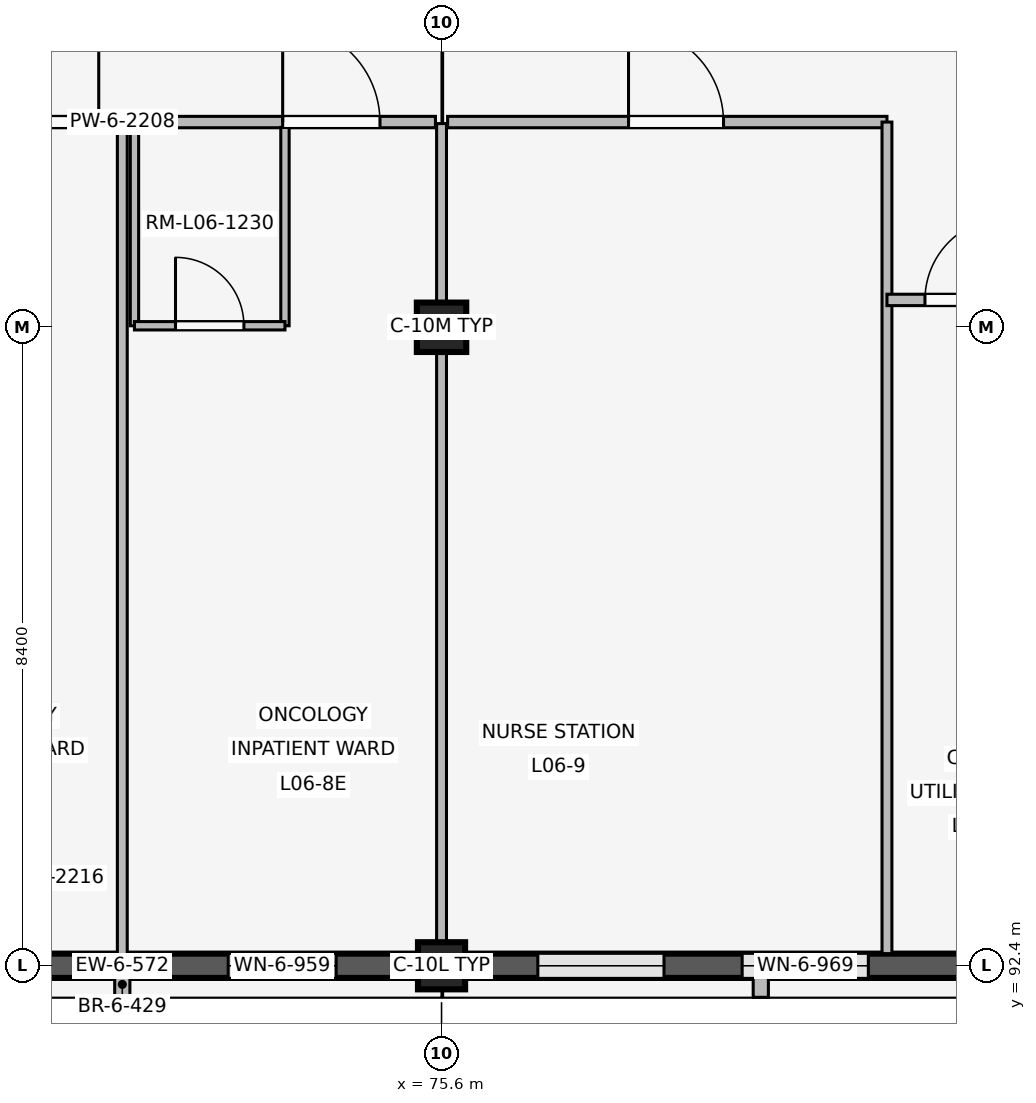
"""IFC4 building model, lengths in metres.
Left out: names, types, materials, properties, quantities, classifications, styles, units other than length and angle.
Written with IfcOpenShell. Run it as: python <this file> out.ifc"""

import sys

from ifc_helpers import new_model, si_unit, direction, frame, frame_2d, origin, origin_2d, place, context, subcontext, project, spatial, rectangle, extrude, element, fill, save


model = new_model("IFC4")
c1 = context("Model", 3, precision=1e-05, world=origin(), true_north=direction((0.0, 1.0)))
c2 = subcontext(c1, "Body", "Model", "MODEL_VIEW")
j1 = project(units=[si_unit("LENGTHUNIT", "METRE"), si_unit("PLANEANGLEUNIT", "RADIAN")], contexts=[c1])
p1 = place(None, origin())
s1 = spatial("IfcSite", under=j1, at=p1, CompositionType="ELEMENT")
p2 = place(p1, origin())
s2 = spatial("IfcBuilding", under=s1, at=p2, CompositionType="ELEMENT")
p3 = place(p2, frame((0.0, 0.0, 24.6)))
s3 = spatial("IfcBuildingStorey", under=s2, at=p3, CompositionType="ELEMENT", Elevation=24.6)
p4 = place(p3, frame((75.6, 92.4, 0.0), z_axis=(0.0, 0.0, 1.0), x_axis=(1.0, 0.0, 0.0)))
e1 = element("IfcColumn", 1, at=p4, inside=s3, PredefinedType="COLUMN", context=c2, shape_type="SweptSolid", body=[
    extrude(rectangle(XDim=0.62, YDim=0.62, at=origin_2d()), origin(), (0.0, 0.0, 1.0), 4.2),
])
p5 = place(p3, frame((75.6, 100.8, 0.0), z_axis=(0.0, 0.0, 1.0), x_axis=(1.0, 0.0, 0.0)))
e2 = element("IfcColumn", 2, at=p5, inside=s3, PredefinedType="COLUMN", context=c2, shape_type="SweptSolid", body=[
    extrude(rectangle(XDim=0.65, YDim=0.65, at=origin_2d()), origin(), (0.0, 0.0, 1.0), 4.2),
])
p6 = place(p3, frame((75.295, 92.4, 0.0), z_axis=(0.0, 0.0, 1.0), x_axis=(-1.0, 0.0, 0.0)))
e3 = element("IfcWall", 3, at=p6, inside=s3, PredefinedType="SOLIDWALL", context=c2, shape_type="SweptSolid", body=[
    extrude(rectangle(XDim=7.79, YDim=0.32, at=frame_2d((3.895, 0.0))), origin(), (0.0, 0.0, 1.0), 3.34),
])
p7 = place(p6, frame((1.082, 0.0, 0.85)))
e4 = element("IfcOpeningElement", 4, at=p7, cuts=e3, PredefinedType="OPENING", context=c2, shape_type="SweptSolid", body=[
    extrude(rectangle(XDim=1.42, YDim=1.45, at=frame_2d((0.71, 0.725))), frame((0.0, 0.17, 0.0), z_axis=(0.0, -1.0, 0.0), x_axis=(1.0, 0.0, 0.0)), (0.0, 0.0, 1.0), 0.34),
])
p8 = place(p6, frame((5.288, 0.0, 0.85)))
e5 = element("IfcOpeningElement", 5, at=p8, cuts=e3, PredefinedType="OPENING", context=c2, shape_type="SweptSolid", body=[
    extrude(rectangle(XDim=1.42, YDim=1.45, at=frame_2d((0.71, 0.725))), frame((0.0, 0.17, 0.0), z_axis=(0.0, -1.0, 0.0), x_axis=(1.0, 0.0, 0.0)), (0.0, 0.0, 1.0), 0.34),
])
p9 = place(p3, frame((71.4, 92.325, 0.0), z_axis=(0.0, 0.0, 1.0), x_axis=(0.0, -1.0, 0.0)))
e6 = element("IfcWall", 6, at=p9, inside=s3, PredefinedType="ELEMENTEDWALL", context=c2, shape_type="SweptSolid", body=[
    extrude(rectangle(XDim=0.34, YDim=0.2, at=frame_2d((0.17, 0.0))), origin(), (0.0, 0.0, 1.0), 3.32),
])
p10 = place(p3, frame((83.695, 92.4, 0.0), z_axis=(0.0, 0.0, 1.0), x_axis=(-1.0, 0.0, 0.0)))
e7 = element("IfcWall", 7, at=p10, inside=s3, PredefinedType="SOLIDWALL", context=c2, shape_type="SweptSolid", body=[
    extrude(rectangle(XDim=7.79, YDim=0.32, at=frame_2d((3.895, 0.0))), origin(), (0.0, 0.0, 1.0), 3.34),
])
p11 = place(p10, frame((2.48, 0.0, 0.85)))
e8 = element("IfcOpeningElement", 8, at=p11, cuts=e7, PredefinedType="OPENING", context=c2, shape_type="SweptSolid", body=[
    extrude(rectangle(XDim=1.66, YDim=1.95, at=frame_2d((0.83, 0.975))), frame((0.0, 0.17, 0.0), z_axis=(0.0, -1.0, 0.0), x_axis=(1.0, 0.0, 0.0)), (0.0, 0.0, 1.0), 0.34),
])
p12 = place(p10, frame((5.168, 0.0, 0.85)))
e9 = element("IfcOpeningElement", 9, at=p12, cuts=e7, PredefinedType="OPENING", context=c2, shape_type="SweptSolid", body=[
    extrude(rectangle(XDim=1.66, YDim=1.95, at=frame_2d((0.83, 0.975))), frame((0.0, 0.17, 0.0), z_axis=(0.0, -1.0, 0.0), x_axis=(1.0, 0.0, 0.0)), (0.0, 0.0, 1.0), 0.34),
])
p13 = place(p3, frame((79.8, 92.325, 0.0), z_axis=(0.0, 0.0, 1.0), x_axis=(0.0, -1.0, 0.0)))
e10 = element("IfcWall", 10, at=p13, inside=s3, PredefinedType="ELEMENTEDWALL", context=c2, shape_type="SweptSolid", body=[
    extrude(rectangle(XDim=0.34, YDim=0.2, at=frame_2d((0.17, 0.0))), origin(), (0.0, 0.0, 1.0), 3.32),
])
p14 = place(p3, frame((67.28, 103.5, 0.0), z_axis=(0.0, 0.0, 1.0), x_axis=(1.0, 0.0, 0.0)))
e11 = element("IfcWall", 11, at=p14, inside=s3, PredefinedType="PARTITIONING", context=c2, shape_type="SweptSolid", body=[
    extrude(rectangle(XDim=8.24, YDim=0.15, at=frame_2d((4.12, 0.0))), origin(), (0.0, 0.0, 1.0), 3.32),
])
p15 = place(p14, frame((2.53, 0.0, 0.0)))
e12 = element("IfcOpeningElement", 12, at=p15, cuts=e11, PredefinedType="OPENING", context=c2, shape_type="SweptSolid", body=[
    extrude(rectangle(XDim=1.28, YDim=2.2, at=frame_2d((0.64, 1.1))), frame((0.0, 0.085, 0.0), z_axis=(0.0, -1.0, 0.0), x_axis=(1.0, 0.0, 0.0)), (0.0, 0.0, 1.0), 0.17),
])
p16 = place(p14, frame((6.23, 0.0, 0.0)))
e13 = element("IfcOpeningElement", 13, at=p16, cuts=e11, PredefinedType="OPENING", context=c2, shape_type="SweptSolid", body=[
    extrude(rectangle(XDim=1.28, YDim=2.2, at=frame_2d((0.64, 1.1))), frame((0.0, 0.085, 0.0), z_axis=(0.0, -1.0, 0.0), x_axis=(1.0, 0.0, 0.0)), (0.0, 0.0, 1.0), 0.17),
])
p17 = place(p3, frame((71.4, 92.5, 0.0), z_axis=(0.0, 0.0, 1.0), x_axis=(0.0, 1.0, 0.0)))
e14 = element("IfcWall", 14, at=p17, inside=s3, PredefinedType="PARTITIONING", context=c2, shape_type="SweptSolid", body=[
    extrude(rectangle(XDim=10.93, YDim=0.13, at=frame_2d((5.465, 0.0))), origin(), (0.0, 0.0, 1.0), 3.32),
])
for number, where, z_axis, x_axis in (
    (15, (71.56, 100.82, 0.0), (0.0, 0.0, 1.0), (0.0, 1.0, 0.0)),
    (16, (73.54, 100.82, 0.0), (0.0, 0.0, 1.0), (0.0, 1.0, 0.0)),
):
    element("IfcWall", number, at=place(p3, frame(where, z_axis=z_axis, x_axis=x_axis)), inside=s3, PredefinedType="PARTITIONING", context=c2, shape_type="SweptSolid", body=[
        extrude(rectangle(XDim=2.61, YDim=0.11, at=frame_2d((1.305, 0.0))), origin(), (0.0, 0.0, 1.0), 3.32),
    ])
p18 = place(p3, frame((71.56, 100.82, 0.0), z_axis=(0.0, 0.0, 1.0), x_axis=(1.0, 0.0, 0.0)))
e17 = element("IfcWall", 17, at=p18, inside=s3, PredefinedType="PARTITIONING", context=c2, shape_type="SweptSolid", body=[
    extrude(rectangle(XDim=1.98, YDim=0.11, at=frame_2d((0.99, 0.0))), origin(), (0.0, 0.0, 1.0), 3.32),
])
p19 = place(p18, frame((0.54, 0.0, 0.0)))
e18 = element("IfcOpeningElement", 18, at=p19, cuts=e17, PredefinedType="OPENING", context=c2, shape_type="SweptSolid", body=[
    extrude(rectangle(XDim=0.9, YDim=2.1, at=frame_2d((0.45, 1.05))), frame((0.0, 0.065, 0.0), z_axis=(0.0, -1.0, 0.0), x_axis=(1.0, 0.0, 0.0)), (0.0, 0.0, 1.0), 0.13),
])
p20 = place(p3, frame((70.05, 93.55, 0.0), z_axis=(0.0, 0.0, 1.0), x_axis=(1.0, 0.0, 0.0)))
e19 = element("IfcWall", 19, at=p20, inside=s3, PredefinedType="PLUMBINGWALL", context=c2, shape_type="SweptSolid", body=[
    extrude(rectangle(XDim=0.9, YDim=0.24, at=frame_2d((0.45, 0.0))), origin(), (0.0, 0.0, 1.0), 3.32),
])
p21 = place(p3, frame((75.6, 92.54, 0.0), z_axis=(0.0, 0.0, 1.0), x_axis=(0.0, 1.0, 0.0)))
e20 = element("IfcWall", 20, at=p21, inside=s3, PredefinedType="PARTITIONING", context=c2, shape_type="SweptSolid", body=[
    extrude(rectangle(XDim=10.94, YDim=0.13, at=frame_2d((5.47, 0.0))), origin(), (0.0, 0.0, 1.0), 3.32),
])
p22 = place(p3, frame((75.68, 103.5, 0.0), z_axis=(0.0, 0.0, 1.0), x_axis=(1.0, 0.0, 0.0)))
e21 = element("IfcWall", 21, at=p22, inside=s3, PredefinedType="PARTITIONING", context=c2, shape_type="SweptSolid", body=[
    extrude(rectangle(XDim=5.78, YDim=0.15, at=frame_2d((2.89, 0.0))), origin(), (0.0, 0.0, 1.0), 3.32),
])
p23 = place(p22, frame((2.38, 0.0, 0.0)))
e22 = element("IfcOpeningElement", 22, at=p23, cuts=e21, PredefinedType="OPENING", context=c2, shape_type="SweptSolid", body=[
    extrude(rectangle(XDim=1.25, YDim=2.2, at=frame_2d((0.625, 1.1))), frame((0.0, 0.085, 0.0), z_axis=(0.0, -1.0, 0.0), x_axis=(1.0, 0.0, 0.0)), (0.0, 0.0, 1.0), 0.17),
])
p24 = place(p3, frame((81.46, 92.56, 0.0), z_axis=(0.0, 0.0, 1.0), x_axis=(0.0, 1.0, 0.0)))
e23 = element("IfcWall", 23, at=p24, inside=s3, PredefinedType="PARTITIONING", context=c2, shape_type="SweptSolid", body=[
    extrude(rectangle(XDim=10.94, YDim=0.13, at=frame_2d((5.47, 0.0))), origin(), (0.0, 0.0, 1.0), 3.32),
])
p25 = place(p3, frame((81.46, 101.16, 0.0), z_axis=(0.0, 0.0, 1.0), x_axis=(1.0, 0.0, 0.0)))
e24 = element("IfcWall", 24, at=p25, inside=s3, PredefinedType="PARTITIONING", context=c2, shape_type="SweptSolid", body=[
    extrude(rectangle(XDim=2.18, YDim=0.15, at=frame_2d((1.09, 0.0))), origin(), (0.0, 0.0, 1.0), 3.32),
])
p26 = place(p25, frame((0.5, 0.0, 0.0)))
e25 = element("IfcOpeningElement", 25, at=p26, cuts=e24, PredefinedType="OPENING", context=c2, shape_type="SweptSolid", body=[
    extrude(rectangle(XDim=1.08, YDim=2.15, at=frame_2d((0.54, 1.075))), frame((0.0, 0.085, 0.0), z_axis=(0.0, -1.0, 0.0), x_axis=(1.0, 0.0, 0.0)), (0.0, 0.0, 1.0), 0.17),
])
p27 = place(p7, origin())
e26 = element("IfcWindow", 26, at=p27, inside=s3, PartitioningType="SINGLE_PANEL", PredefinedType="WINDOW", context=c2, shape_type="SweptSolid", body=[
    extrude(rectangle(XDim=1.42, YDim=1.45, at=frame_2d((0.71, 0.725))), frame((0.0, 0.03, 0.0), z_axis=(0.0, -1.0, 0.0), x_axis=(1.0, 0.0, 0.0)), (0.0, 0.0, 1.0), 0.06),
])
fill(e4, e26)
p28 = place(p11, origin())
e27 = element("IfcWindow", 27, at=p28, inside=s3, PartitioningType="SINGLE_PANEL", PredefinedType="WINDOW", context=c2, shape_type="SweptSolid", body=[
    extrude(rectangle(XDim=1.66, YDim=1.95, at=frame_2d((0.83, 0.975))), frame((0.0, 0.03, 0.0), z_axis=(0.0, -1.0, 0.0), x_axis=(1.0, 0.0, 0.0)), (0.0, 0.0, 1.0), 0.06),
])
fill(e8, e27)
p29 = place(p12, origin())
e28 = element("IfcWindow", 28, at=p29, inside=s3, PartitioningType="SINGLE_PANEL", PredefinedType="WINDOW", context=c2, shape_type="SweptSolid", body=[
    extrude(rectangle(XDim=1.66, YDim=1.95, at=frame_2d((0.83, 0.975))), frame((0.0, 0.03, 0.0), z_axis=(0.0, -1.0, 0.0), x_axis=(1.0, 0.0, 0.0)), (0.0, 0.0, 1.0), 0.06),
])
fill(e9, e28)
p30 = place(p15, origin())
e29 = element("IfcDoor", 29, at=p30, inside=s3, OperationType="SINGLE_SWING_RIGHT", PredefinedType="DOOR", context=c2, shape_type="SweptSolid", body=[
    extrude(rectangle(XDim=1.28, YDim=2.2, at=frame_2d((0.64, 1.1))), frame((0.0, 0.025, 0.0), z_axis=(0.0, -1.0, 0.0), x_axis=(1.0, 0.0, 0.0)), (0.0, 0.0, 1.0), 0.05),
])
fill(e12, e29)
p31 = place(p16, origin())
e30 = element("IfcDoor", 30, at=p31, inside=s3, OperationType="SINGLE_SWING_LEFT", PredefinedType="DOOR", context=c2, shape_type="SweptSolid", body=[
    extrude(rectangle(XDim=1.28, YDim=2.2, at=frame_2d((0.64, 1.1))), frame((0.0, 0.025, 0.0), z_axis=(0.0, -1.0, 0.0), x_axis=(1.0, 0.0, 0.0)), (0.0, 0.0, 1.0), 0.05),
])
fill(e13, e30)
p32 = place(p19, origin())
e31 = element("IfcDoor", 31, at=p32, inside=s3, OperationType="SINGLE_SWING_LEFT", PredefinedType="DOOR", context=c2, shape_type="SweptSolid", body=[
    extrude(rectangle(XDim=0.9, YDim=2.1, at=frame_2d((0.45, 1.05))), frame((0.0, 0.025, 0.0), z_axis=(0.0, -1.0, 0.0), x_axis=(1.0, 0.0, 0.0)), (0.0, 0.0, 1.0), 0.05),
])
fill(e18, e31)
p33 = place(p23, origin())
e32 = element("IfcDoor", 32, at=p33, inside=s3, OperationType="SINGLE_SWING_LEFT", PredefinedType="DOOR", context=c2, shape_type="SweptSolid", body=[
    extrude(rectangle(XDim=1.25, YDim=2.2, at=frame_2d((0.625, 1.1))), frame((0.0, 0.025, 0.0), z_axis=(0.0, -1.0, 0.0), x_axis=(1.0, 0.0, 0.0)), (0.0, 0.0, 1.0), 0.05),
])
fill(e22, e32)
p34 = place(p26, origin())
e33 = element("IfcDoor", 33, at=p34, inside=s3, OperationType="SINGLE_SWING_RIGHT", PredefinedType="DOOR", context=c2, shape_type="SweptSolid", body=[
    extrude(rectangle(XDim=1.08, YDim=2.15, at=frame_2d((0.54, 1.075))), frame((0.0, 0.025, 0.0), z_axis=(0.0, -1.0, 0.0), x_axis=(1.0, 0.0, 0.0)), (0.0, 0.0, 1.0), 0.05),
])
fill(e25, e33)
save(model, sys.argv[1])
